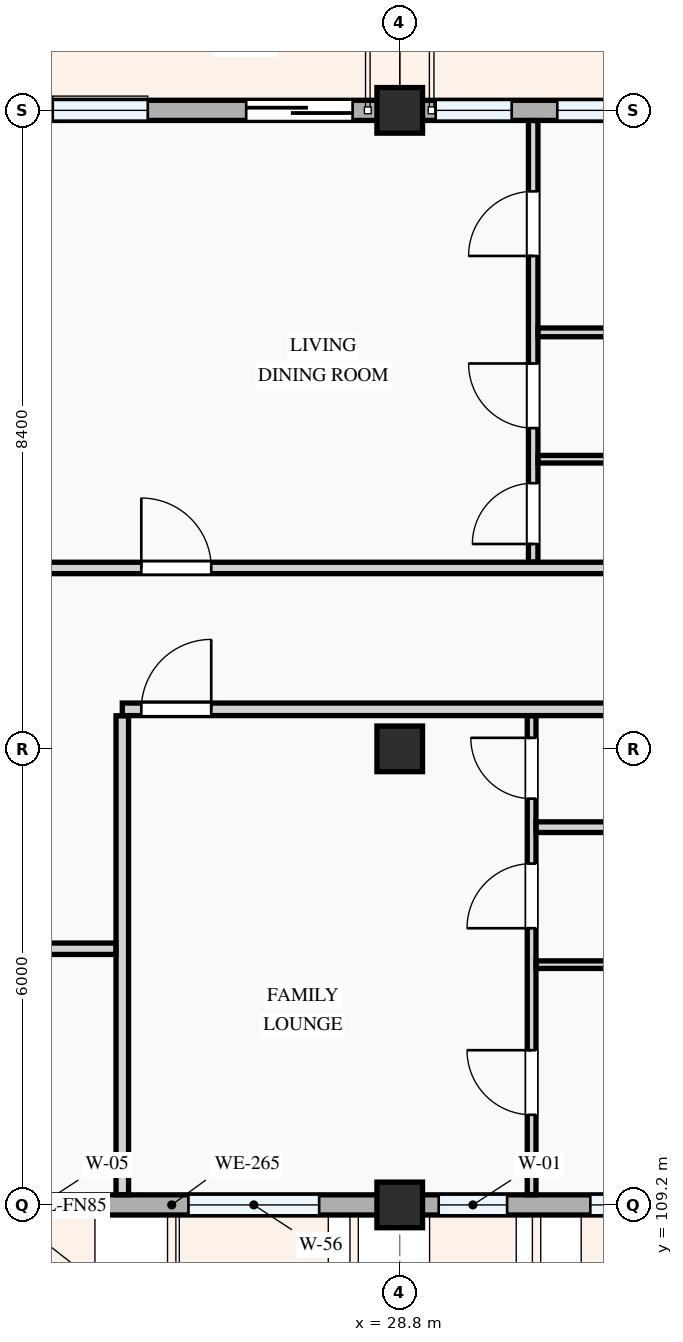
"""IFC4 building model, lengths in metres.
Left out: names, types, materials, properties, quantities, classifications, styles, units other than length and angle.
Written with IfcOpenShell. Run it as: python <this file> out.ifc"""

import sys

from ifc_helpers import new_model, si_unit, direction, frame, frame_2d, origin, origin_2d, place, context, subcontext, project, spatial, rectangle, extrude, element, fill, save


model = new_model("IFC4")
c1 = context("Model", 3, precision=1e-05, world=origin(), true_north=direction((0.0, 1.0)))
c2 = subcontext(c1, "Body", "Model", "MODEL_VIEW")
j1 = project(units=[si_unit("LENGTHUNIT", "METRE"), si_unit("PLANEANGLEUNIT", "RADIAN")], contexts=[c1])
p1 = place(None, origin())
s1 = spatial("IfcSite", under=j1, at=p1, CompositionType="ELEMENT")
p2 = place(p1, origin())
s2 = spatial("IfcBuilding", under=s1, at=p2, CompositionType="ELEMENT")
p3 = place(p2, frame((0.0, 0.0, 34.5)))
s3 = spatial("IfcBuildingStorey", under=s2, at=p3, CompositionType="ELEMENT", Elevation=34.5)
for number, where, z_axis, x_axis in (
    (1, (28.8, 109.2, 0.0), (0.0, 0.0, 1.0), (1.0, 0.0, 0.0)),
    (2, (28.8, 115.2, 0.0), (0.0, 0.0, 1.0), (1.0, 0.0, 0.0)),
    (3, (28.8, 123.6, 0.0), (0.0, 0.0, 1.0), (1.0, 0.0, 0.0)),
):
    element("IfcColumn", number, at=place(p3, frame(where, z_axis=z_axis, x_axis=x_axis)), inside=s3, PredefinedType="COLUMN", context=c2, shape_type="SweptSolid", body=[
        extrude(rectangle(XDim=0.6, YDim=0.6, at=origin_2d()), origin(), (0.0, 0.0, 1.0), 3.3),
    ])
p4 = place(p3, frame((22.8, 109.2, 0.0), z_axis=(0.0, 0.0, 1.0), x_axis=(1.0, 0.0, 0.0)))
e4 = element("IfcWall", 4, at=p4, inside=s3, PredefinedType="STANDARD", context=c2, shape_type="SweptSolid", body=[
    extrude(rectangle(XDim=6.0, YDim=0.265, at=frame_2d((3.0, 0.0))), origin(), (0.0, 0.0, 1.0), 2.525),
])
p5 = place(p4, frame((0.67, 0.0, 0.78)))
e5 = element("IfcOpeningElement", 5, at=p5, cuts=e4, PredefinedType="OPENING", context=c2, shape_type="SweptSolid", body=[
    extrude(rectangle(XDim=1.2, YDim=1.5, at=frame_2d((0.6, 0.75))), frame((0.0, 0.143, 0.0), z_axis=(0.0, -1.0, 0.0), x_axis=(1.0, 0.0, 0.0)), (0.0, 0.0, 1.0), 0.285),
])
p6 = place(p4, frame((3.22, 0.0, 0.78)))
e6 = element("IfcOpeningElement", 6, at=p6, cuts=e4, PredefinedType="OPENING", context=c2, shape_type="SweptSolid", body=[
    extrude(rectangle(XDim=1.72, YDim=1.52, at=frame_2d((0.86, 0.76))), frame((0.0, 0.143, 0.0), z_axis=(0.0, -1.0, 0.0), x_axis=(1.0, 0.0, 0.0)), (0.0, 0.0, 1.0), 0.285),
])
p7 = place(p3, frame((28.8, 109.2, 0.0), z_axis=(0.0, 0.0, 1.0), x_axis=(1.0, 0.0, 0.0)))
e7 = element("IfcWall", 7, at=p7, inside=s3, PredefinedType="STANDARD", context=c2, shape_type="SweptSolid", body=[
    extrude(rectangle(XDim=8.4, YDim=0.265, at=frame_2d((4.2, 0.0))), origin(), (0.0, 0.0, 1.0), 2.375),
])
p8 = place(p7, frame((0.512, 0.0, 0.78)))
e8 = element("IfcOpeningElement", 8, at=p8, cuts=e7, PredefinedType="OPENING", context=c2, shape_type="SweptSolid", body=[
    extrude(rectangle(XDim=0.9, YDim=1.2, at=frame_2d((0.45, 0.6))), frame((0.0, 0.143, 0.0), z_axis=(0.0, -1.0, 0.0), x_axis=(1.0, 0.0, 0.0)), (0.0, 0.0, 1.0), 0.285),
])
p9 = place(p7, frame((2.508, 0.0, 0.78)))
e9 = element("IfcOpeningElement", 9, at=p9, cuts=e7, PredefinedType="OPENING", context=c2, shape_type="SweptSolid", body=[
    extrude(rectangle(XDim=2.04, YDim=1.46, at=frame_2d((1.02, 0.73))), frame((0.0, 0.143, 0.0), z_axis=(0.0, -1.0, 0.0), x_axis=(1.0, 0.0, 0.0)), (0.0, 0.0, 1.0), 0.285),
])
p10 = place(p7, frame((5.675, 0.0, 0.78)))
e10 = element("IfcOpeningElement", 10, at=p10, cuts=e7, PredefinedType="OPENING", context=c2, shape_type="SweptSolid", body=[
    extrude(rectangle(XDim=2.18, YDim=1.48, at=frame_2d((1.09, 0.74))), frame((0.0, 0.143, 0.0), z_axis=(0.0, -1.0, 0.0), x_axis=(1.0, 0.0, 0.0)), (0.0, 0.0, 1.0), 0.285),
])
p11 = place(p3, frame((37.2, 123.6, 0.0), z_axis=(0.0, 0.0, 1.0), x_axis=(-1.0, 0.0, 0.0)))
e11 = element("IfcWall", 11, at=p11, inside=s3, PredefinedType="STANDARD", context=c2, shape_type="SweptSolid", body=[
    extrude(rectangle(XDim=8.4, YDim=0.265, at=frame_2d((4.2, 0.0))), origin(), (0.0, 0.0, 1.0), 2.345),
])
p12 = place(p11, frame((3.41, 0.0, 0.0)))
e12 = element("IfcOpeningElement", 12, at=p12, cuts=e11, PredefinedType="OPENING", context=c2, shape_type="SweptSolid", body=[
    extrude(rectangle(XDim=1.3, YDim=2.15, at=frame_2d((0.65, 1.075))), frame((0.0, 0.143, 0.0), z_axis=(0.0, -1.0, 0.0), x_axis=(1.0, 0.0, 0.0)), (0.0, 0.0, 1.0), 0.285),
])
p13 = place(p11, frame((1.01, 0.0, 0.78)))
e13 = element("IfcOpeningElement", 13, at=p13, cuts=e11, PredefinedType="OPENING", context=c2, shape_type="SweptSolid", body=[
    extrude(rectangle(XDim=1.25, YDim=1.45, at=frame_2d((0.625, 0.725))), frame((0.0, 0.143, 0.0), z_axis=(0.0, -1.0, 0.0), x_axis=(1.0, 0.0, 0.0)), (0.0, 0.0, 1.0), 0.285),
])
p14 = place(p11, frame((5.077, 0.0, 0.78)))
e14 = element("IfcOpeningElement", 14, at=p14, cuts=e11, PredefinedType="OPENING", context=c2, shape_type="SweptSolid", body=[
    extrude(rectangle(XDim=1.25, YDim=1.3, at=frame_2d((0.625, 0.65))), frame((0.0, 0.143, 0.0), z_axis=(0.0, -1.0, 0.0), x_axis=(1.0, 0.0, 0.0)), (0.0, 0.0, 1.0), 0.285),
])
p15 = place(p11, frame((6.927, 0.0, 0.78)))
e15 = element("IfcOpeningElement", 15, at=p15, cuts=e11, PredefinedType="OPENING", context=c2, shape_type="SweptSolid", body=[
    extrude(rectangle(XDim=1.0, YDim=1.25, at=frame_2d((0.5, 0.625))), frame((0.0, 0.143, 0.0), z_axis=(0.0, -1.0, 0.0), x_axis=(1.0, 0.0, 0.0)), (0.0, 0.0, 1.0), 0.285),
])
p16 = place(p3, frame((28.8, 123.6, 0.0), z_axis=(0.0, 0.0, 1.0), x_axis=(-1.0, 0.0, 0.0)))
e16 = element("IfcWall", 16, at=p16, inside=s3, PredefinedType="STANDARD", context=c2, shape_type="SweptSolid", body=[
    extrude(rectangle(XDim=6.0, YDim=0.265, at=frame_2d((3.0, 0.0))), origin(), (0.0, 0.0, 1.0), 2.445),
])
p17 = place(p16, frame((0.62, 0.0, 0.0)))
e17 = element("IfcOpeningElement", 17, at=p17, cuts=e16, PredefinedType="OPENING", context=c2, shape_type="SweptSolid", body=[
    extrude(rectangle(XDim=1.4, YDim=2.2, at=frame_2d((0.7, 1.1))), frame((0.0, 0.143, 0.0), z_axis=(0.0, -1.0, 0.0), x_axis=(1.0, 0.0, 0.0)), (0.0, 0.0, 1.0), 0.285),
])
p18 = place(p16, frame((3.315, 0.0, 0.78)))
e18 = element("IfcOpeningElement", 18, at=p18, cuts=e16, PredefinedType="OPENING", context=c2, shape_type="SweptSolid", body=[
    extrude(rectangle(XDim=1.25, YDim=1.45, at=frame_2d((0.625, 0.725))), frame((0.0, 0.143, 0.0), z_axis=(0.0, -1.0, 0.0), x_axis=(1.0, 0.0, 0.0)), (0.0, 0.0, 1.0), 0.285),
])
p19 = place(p3, frame((25.15, 109.334, 0.0), z_axis=(0.0, 0.0, 1.0), x_axis=(0.0, 1.0, 0.0)))
e19 = element("IfcWall", 19, at=p19, inside=s3, PredefinedType="PARTITIONING", context=c2, shape_type="SweptSolid", body=[
    extrude(rectangle(XDim=6.301, YDim=0.165, at=frame_2d((3.15, 0.0))), origin(), (0.0, 0.0, 1.0), 3.0),
])
p20 = place(p3, frame((22.66, 112.57, 0.0), z_axis=(0.0, 0.0, 1.0), x_axis=(1.0, 0.0, 0.0)))
e20 = element("IfcWall", 20, at=p20, inside=s3, PredefinedType="PARTITIONING", context=c2, shape_type="SweptSolid", body=[
    extrude(rectangle(XDim=2.406, YDim=0.15, at=frame_2d((1.203, 0.0))), origin(), (0.0, 0.0, 1.0), 3.0),
])
p21 = place(p3, frame((30.535, 109.334, 0.0), z_axis=(0.0, 0.0, 1.0), x_axis=(0.0, 1.0, 0.0)))
e21 = element("IfcWall", 21, at=p21, inside=s3, PredefinedType="PARTITIONING", context=c2, shape_type="SweptSolid", body=[
    extrude(rectangle(XDim=6.301, YDim=0.115, at=frame_2d((3.15, 0.0))), origin(), (0.0, 0.0, 1.0), 3.0),
])
p22 = place(p21, frame((1.051, 0.0, 0.0)))
e22 = element("IfcOpeningElement", 22, at=p22, cuts=e21, PredefinedType="OPENING", context=c2, shape_type="SweptSolid", body=[
    extrude(rectangle(XDim=0.85, YDim=2.1, at=frame_2d((0.425, 1.05))), frame((0.0, 0.067, 0.0), z_axis=(0.0, -1.0, 0.0), x_axis=(1.0, 0.0, 0.0)), (0.0, 0.0, 1.0), 0.135),
])
p23 = place(p21, frame((3.506, 0.0, 0.0)))
e23 = element("IfcOpeningElement", 23, at=p23, cuts=e21, PredefinedType="OPENING", context=c2, shape_type="SweptSolid", body=[
    extrude(rectangle(XDim=0.85, YDim=2.1, at=frame_2d((0.425, 1.05))), frame((0.0, 0.067, 0.0), z_axis=(0.0, -1.0, 0.0), x_axis=(1.0, 0.0, 0.0)), (0.0, 0.0, 1.0), 0.135),
])
p24 = place(p21, frame((5.21, 0.0, 0.0)))
e24 = element("IfcOpeningElement", 24, at=p24, cuts=e21, PredefinedType="OPENING", context=c2, shape_type="SweptSolid", body=[
    extrude(rectangle(XDim=0.8, YDim=2.1, at=frame_2d((0.4, 1.05))), frame((0.0, 0.067, 0.0), z_axis=(0.0, -1.0, 0.0), x_axis=(1.0, 0.0, 0.0)), (0.0, 0.0, 1.0), 0.135),
])
p25 = place(p3, frame((30.594, 112.361, 0.0), z_axis=(0.0, 0.0, 1.0), x_axis=(1.0, 0.0, 0.0)))
e25 = element("IfcWall", 25, at=p25, inside=s3, PredefinedType="PARTITIONING", context=c2, shape_type="SweptSolid", body=[
    extrude(rectangle(XDim=3.431, YDim=0.1, at=frame_2d((1.715, 0.0))), origin(), (0.0, 0.0, 1.0), 3.0),
])
p26 = place(p3, frame((30.594, 114.17, 0.0), z_axis=(0.0, 0.0, 1.0), x_axis=(1.0, 0.0, 0.0)))
e26 = element("IfcWall", 26, at=p26, inside=s3, PredefinedType="PARTITIONING", context=c2, shape_type="SweptSolid", body=[
    extrude(rectangle(XDim=3.431, YDim=0.14, at=frame_2d((1.715, 0.0))), origin(), (0.0, 0.0, 1.0), 3.0),
])
p27 = place(p3, frame((30.556, 117.657, 0.0), z_axis=(0.0, 0.0, 1.0), x_axis=(0.0, 1.0, 0.0)))
e27 = element("IfcWall", 27, at=p27, inside=s3, PredefinedType="PARTITIONING", context=c2, shape_type="SweptSolid", body=[
    extrude(rectangle(XDim=5.809, YDim=0.125, at=frame_2d((2.904, 0.0))), origin(), (0.0, 0.0, 1.0), 3.0),
])
p28 = place(p27, frame((0.238, 0.0, 0.0)))
e28 = element("IfcOpeningElement", 28, at=p28, cuts=e27, PredefinedType="OPENING", context=c2, shape_type="SweptSolid", body=[
    extrude(rectangle(XDim=0.8, YDim=2.1, at=frame_2d((0.4, 1.05))), frame((0.0, 0.073, 0.0), z_axis=(0.0, -1.0, 0.0), x_axis=(1.0, 0.0, 0.0)), (0.0, 0.0, 1.0), 0.145),
])
p29 = place(p27, frame((1.763, 0.0, 0.0)))
e29 = element("IfcOpeningElement", 29, at=p29, cuts=e27, PredefinedType="OPENING", context=c2, shape_type="SweptSolid", body=[
    extrude(rectangle(XDim=0.85, YDim=2.1, at=frame_2d((0.425, 1.05))), frame((0.0, 0.073, 0.0), z_axis=(0.0, -1.0, 0.0), x_axis=(1.0, 0.0, 0.0)), (0.0, 0.0, 1.0), 0.145),
])
p30 = place(p27, frame((4.028, 0.0, 0.0)))
e30 = element("IfcOpeningElement", 30, at=p30, cuts=e27, PredefinedType="OPENING", context=c2, shape_type="SweptSolid", body=[
    extrude(rectangle(XDim=0.85, YDim=2.1, at=frame_2d((0.425, 1.05))), frame((0.0, 0.073, 0.0), z_axis=(0.0, -1.0, 0.0), x_axis=(1.0, 0.0, 0.0)), (0.0, 0.0, 1.0), 0.145),
])
p31 = place(p3, frame((30.62, 120.679, 0.0), z_axis=(0.0, 0.0, 1.0), x_axis=(1.0, 0.0, 0.0)))
e31 = element("IfcWall", 31, at=p31, inside=s3, PredefinedType="PARTITIONING", context=c2, shape_type="SweptSolid", body=[
    extrude(rectangle(XDim=3.398, YDim=0.115, at=frame_2d((1.699, 0.0))), origin(), (0.0, 0.0, 1.0), 3.0),
])
p32 = place(p3, frame((30.62, 119.01, 0.0), z_axis=(0.0, 0.0, 1.0), x_axis=(1.0, 0.0, 0.0)))
e32 = element("IfcWall", 32, at=p32, inside=s3, PredefinedType="PARTITIONING", context=c2, shape_type="SweptSolid", body=[
    extrude(rectangle(XDim=3.398, YDim=0.1, at=frame_2d((1.699, 0.0))), origin(), (0.0, 0.0, 1.0), 3.0),
])
p33 = place(p3, frame((25.15, 115.72, 0.0), z_axis=(0.0, 0.0, 1.0), x_axis=(1.0, 0.0, 0.0)))
e33 = element("IfcWall", 33, at=p33, inside=s3, PredefinedType="PARTITIONING", context=c2, shape_type="SweptSolid", body=[
    extrude(rectangle(XDim=26.316, YDim=0.165, at=frame_2d((13.158, 0.0))), origin(), (0.0, 0.0, 1.0), 3.0),
])
p34 = place(p33, frame((0.25, 0.0, 0.0)))
e34 = element("IfcOpeningElement", 34, at=p34, cuts=e33, PredefinedType="OPENING", context=c2, shape_type="SweptSolid", body=[
    extrude(rectangle(XDim=0.92, YDim=2.1, at=frame_2d((0.46, 1.05))), frame((0.0, 0.093, 0.0), z_axis=(0.0, -1.0, 0.0), x_axis=(1.0, 0.0, 0.0)), (0.0, 0.0, 1.0), 0.185),
])
p35 = place(p33, frame((9.22, 0.0, 0.0)))
e35 = element("IfcOpeningElement", 35, at=p35, cuts=e33, PredefinedType="OPENING", context=c2, shape_type="SweptSolid", body=[
    extrude(rectangle(XDim=0.92, YDim=2.1, at=frame_2d((0.46, 1.05))), frame((0.0, 0.093, 0.0), z_axis=(0.0, -1.0, 0.0), x_axis=(1.0, 0.0, 0.0)), (0.0, 0.0, 1.0), 0.185),
])
p36 = place(p33, frame((20.11, 0.0, 0.0)))
e36 = element("IfcOpeningElement", 36, at=p36, cuts=e33, PredefinedType="OPENING", context=c2, shape_type="SweptSolid", body=[
    extrude(rectangle(XDim=0.92, YDim=2.1, at=frame_2d((0.46, 1.05))), frame((0.0, 0.093, 0.0), z_axis=(0.0, -1.0, 0.0), x_axis=(1.0, 0.0, 0.0)), (0.0, 0.0, 1.0), 0.185),
])
p37 = place(p3, frame((22.66, 117.58, 0.0), z_axis=(0.0, 0.0, 1.0), x_axis=(1.0, 0.0, 0.0)))
e37 = element("IfcWall", 37, at=p37, inside=s3, PredefinedType="PARTITIONING", context=c2, shape_type="SweptSolid", body=[
    extrude(rectangle(XDim=28.806, YDim=0.15, at=frame_2d((14.403, 0.0))), origin(), (0.0, 0.0, 1.0), 3.0),
])
p38 = place(p37, frame((2.74, 0.0, 0.0)))
e38 = element("IfcOpeningElement", 38, at=p38, cuts=e37, PredefinedType="OPENING", context=c2, shape_type="SweptSolid", body=[
    extrude(rectangle(XDim=0.92, YDim=2.1, at=frame_2d((0.46, 1.05))), frame((0.0, 0.085, 0.0), z_axis=(0.0, -1.0, 0.0), x_axis=(1.0, 0.0, 0.0)), (0.0, 0.0, 1.0), 0.17),
])
p39 = place(p37, frame((11.71, 0.0, 0.0)))
e39 = element("IfcOpeningElement", 39, at=p39, cuts=e37, PredefinedType="OPENING", context=c2, shape_type="SweptSolid", body=[
    extrude(rectangle(XDim=0.96, YDim=2.12, at=frame_2d((0.48, 1.06))), frame((0.0, 0.085, 0.0), z_axis=(0.0, -1.0, 0.0), x_axis=(1.0, 0.0, 0.0)), (0.0, 0.0, 1.0), 0.17),
])
p40 = place(p37, frame((22.397, 0.0, 0.0)))
e40 = element("IfcOpeningElement", 40, at=p40, cuts=e37, PredefinedType="OPENING", context=c2, shape_type="SweptSolid", body=[
    extrude(rectangle(XDim=0.92, YDim=2.1, at=frame_2d((0.46, 1.05))), frame((0.0, 0.085, 0.0), z_axis=(0.0, -1.0, 0.0), x_axis=(1.0, 0.0, 0.0)), (0.0, 0.0, 1.0), 0.17),
])
p41 = place(p5, origin())
e41 = element("IfcWindow", 41, at=p41, inside=s3, PartitioningType="SINGLE_PANEL", PredefinedType="WINDOW", context=c2, shape_type="SweptSolid", body=[
    extrude(rectangle(XDim=1.2, YDim=1.5, at=frame_2d((0.6, 0.75))), frame((0.0, 0.03, 0.0), z_axis=(0.0, -1.0, 0.0), x_axis=(1.0, 0.0, 0.0)), (0.0, 0.0, 1.0), 0.06),
])
fill(e5, e41)
p42 = place(p6, origin())
e42 = element("IfcWindow", 42, at=p42, inside=s3, PartitioningType="DOUBLE_PANEL_VERTICAL", PredefinedType="WINDOW", context=c2, shape_type="SweptSolid", body=[
    extrude(rectangle(XDim=1.72, YDim=1.52, at=frame_2d((0.86, 0.76))), frame((0.0, 0.03, 0.0), z_axis=(0.0, -1.0, 0.0), x_axis=(1.0, 0.0, 0.0)), (0.0, 0.0, 1.0), 0.06),
])
fill(e6, e42)
p43 = place(p8, origin())
e43 = element("IfcWindow", 43, at=p43, inside=s3, PartitioningType="SINGLE_PANEL", PredefinedType="WINDOW", context=c2, shape_type="SweptSolid", body=[
    extrude(rectangle(XDim=0.9, YDim=1.2, at=frame_2d((0.45, 0.6))), frame((0.0, 0.03, 0.0), z_axis=(0.0, -1.0, 0.0), x_axis=(1.0, 0.0, 0.0)), (0.0, 0.0, 1.0), 0.06),
])
fill(e8, e43)
p44 = place(p9, origin())
e44 = element("IfcWindow", 44, at=p44, inside=s3, PartitioningType="DOUBLE_PANEL_VERTICAL", PredefinedType="WINDOW", context=c2, shape_type="SweptSolid", body=[
    extrude(rectangle(XDim=2.04, YDim=1.46, at=frame_2d((1.02, 0.73))), frame((0.0, 0.03, 0.0), z_axis=(0.0, -1.0, 0.0), x_axis=(1.0, 0.0, 0.0)), (0.0, 0.0, 1.0), 0.06),
])
fill(e9, e44)
p45 = place(p14, origin())
e45 = element("IfcWindow", 45, at=p45, inside=s3, PartitioningType="SINGLE_PANEL", PredefinedType="WINDOW", context=c2, shape_type="SweptSolid", body=[
    extrude(rectangle(XDim=1.25, YDim=1.3, at=frame_2d((0.625, 0.65))), frame((0.0, 0.03, 0.0), z_axis=(0.0, -1.0, 0.0), x_axis=(1.0, 0.0, 0.0)), (0.0, 0.0, 1.0), 0.06),
])
fill(e14, e45)
p46 = place(p15, origin())
e46 = element("IfcWindow", 46, at=p46, inside=s3, PartitioningType="SINGLE_PANEL", PredefinedType="WINDOW", context=c2, shape_type="SweptSolid", body=[
    extrude(rectangle(XDim=1.0, YDim=1.25, at=frame_2d((0.5, 0.625))), frame((0.0, 0.03, 0.0), z_axis=(0.0, -1.0, 0.0), x_axis=(1.0, 0.0, 0.0)), (0.0, 0.0, 1.0), 0.06),
])
fill(e15, e46)
p47 = place(p17, frame((1.4, 0.0, 0.0), z_axis=(0.0, 0.0, 1.0), x_axis=(-1.0, 0.0, 0.0)))
e47 = element("IfcDoor", 47, at=p47, inside=s3, OperationType="SLIDING_TO_LEFT", PredefinedType="DOOR", context=c2, shape_type="SweptSolid", body=[
    extrude(rectangle(XDim=1.4, YDim=2.2, at=frame_2d((0.7, 1.1))), frame((0.0, 0.025, 0.0), z_axis=(0.0, -1.0, 0.0), x_axis=(1.0, 0.0, 0.0)), (0.0, 0.0, 1.0), 0.05),
])
fill(e17, e47)
p48 = place(p18, origin())
e48 = element("IfcWindow", 48, at=p48, inside=s3, PartitioningType="SINGLE_PANEL", PredefinedType="WINDOW", context=c2, shape_type="SweptSolid", body=[
    extrude(rectangle(XDim=1.25, YDim=1.45, at=frame_2d((0.625, 0.725))), frame((0.0, 0.03, 0.0), z_axis=(0.0, -1.0, 0.0), x_axis=(1.0, 0.0, 0.0)), (0.0, 0.0, 1.0), 0.06),
])
fill(e18, e48)
p49 = place(p22, origin())
e49 = element("IfcDoor", 49, at=p49, inside=s3, OperationType="SINGLE_SWING_RIGHT", PredefinedType="DOOR", context=c2, shape_type="SweptSolid", body=[
    extrude(rectangle(XDim=0.85, YDim=2.1, at=frame_2d((0.425, 1.05))), frame((0.0, 0.025, 0.0), z_axis=(0.0, -1.0, 0.0), x_axis=(1.0, 0.0, 0.0)), (0.0, 0.0, 1.0), 0.05),
])
fill(e22, e49)
p50 = place(p23, origin())
e50 = element("IfcDoor", 50, at=p50, inside=s3, OperationType="SINGLE_SWING_LEFT", PredefinedType="DOOR", context=c2, shape_type="SweptSolid", body=[
    extrude(rectangle(XDim=0.85, YDim=2.1, at=frame_2d((0.425, 1.05))), frame((0.0, 0.025, 0.0), z_axis=(0.0, -1.0, 0.0), x_axis=(1.0, 0.0, 0.0)), (0.0, 0.0, 1.0), 0.05),
])
fill(e23, e50)
p51 = place(p24, origin())
e51 = element("IfcDoor", 51, at=p51, inside=s3, OperationType="SINGLE_SWING_RIGHT", PredefinedType="DOOR", context=c2, shape_type="SweptSolid", body=[
    extrude(rectangle(XDim=0.8, YDim=2.1, at=frame_2d((0.4, 1.05))), frame((0.0, 0.025, 0.0), z_axis=(0.0, -1.0, 0.0), x_axis=(1.0, 0.0, 0.0)), (0.0, 0.0, 1.0), 0.05),
])
fill(e24, e51)
p52 = place(p28, origin())
e52 = element("IfcDoor", 52, at=p52, inside=s3, OperationType="SINGLE_SWING_LEFT", PredefinedType="DOOR", context=c2, shape_type="SweptSolid", body=[
    extrude(rectangle(XDim=0.8, YDim=2.1, at=frame_2d((0.4, 1.05))), frame((0.0, 0.025, 0.0), z_axis=(0.0, -1.0, 0.0), x_axis=(1.0, 0.0, 0.0)), (0.0, 0.0, 1.0), 0.05),
])
fill(e28, e52)
p53 = place(p29, origin())
e53 = element("IfcDoor", 53, at=p53, inside=s3, OperationType="SINGLE_SWING_RIGHT", PredefinedType="DOOR", context=c2, shape_type="SweptSolid", body=[
    extrude(rectangle(XDim=0.85, YDim=2.1, at=frame_2d((0.425, 1.05))), frame((0.0, 0.025, 0.0), z_axis=(0.0, -1.0, 0.0), x_axis=(1.0, 0.0, 0.0)), (0.0, 0.0, 1.0), 0.05),
])
fill(e29, e53)
p54 = place(p30, origin())
e54 = element("IfcDoor", 54, at=p54, inside=s3, OperationType="SINGLE_SWING_LEFT", PredefinedType="DOOR", context=c2, shape_type="SweptSolid", body=[
    extrude(rectangle(XDim=0.85, YDim=2.1, at=frame_2d((0.425, 1.05))), frame((0.0, 0.025, 0.0), z_axis=(0.0, -1.0, 0.0), x_axis=(1.0, 0.0, 0.0)), (0.0, 0.0, 1.0), 0.05),
])
fill(e30, e54)
p55 = place(p34, origin())
e55 = element("IfcDoor", 55, at=p55, inside=s3, OperationType="SINGLE_SWING_RIGHT", PredefinedType="DOOR", context=c2, shape_type="SweptSolid", body=[
    extrude(rectangle(XDim=0.92, YDim=2.1, at=frame_2d((0.46, 1.05))), frame((0.0, 0.025, 0.0), z_axis=(0.0, -1.0, 0.0), x_axis=(1.0, 0.0, 0.0)), (0.0, 0.0, 1.0), 0.05),
])
fill(e34, e55)
p56 = place(p38, origin())
e56 = element("IfcDoor", 56, at=p56, inside=s3, OperationType="SINGLE_SWING_LEFT", PredefinedType="DOOR", context=c2, shape_type="SweptSolid", body=[
    extrude(rectangle(XDim=0.92, YDim=2.1, at=frame_2d((0.46, 1.05))), frame((0.0, 0.025, 0.0), z_axis=(0.0, -1.0, 0.0), x_axis=(1.0, 0.0, 0.0)), (0.0, 0.0, 1.0), 0.05),
])
fill(e38, e56)
save(model, sys.argv[1])
